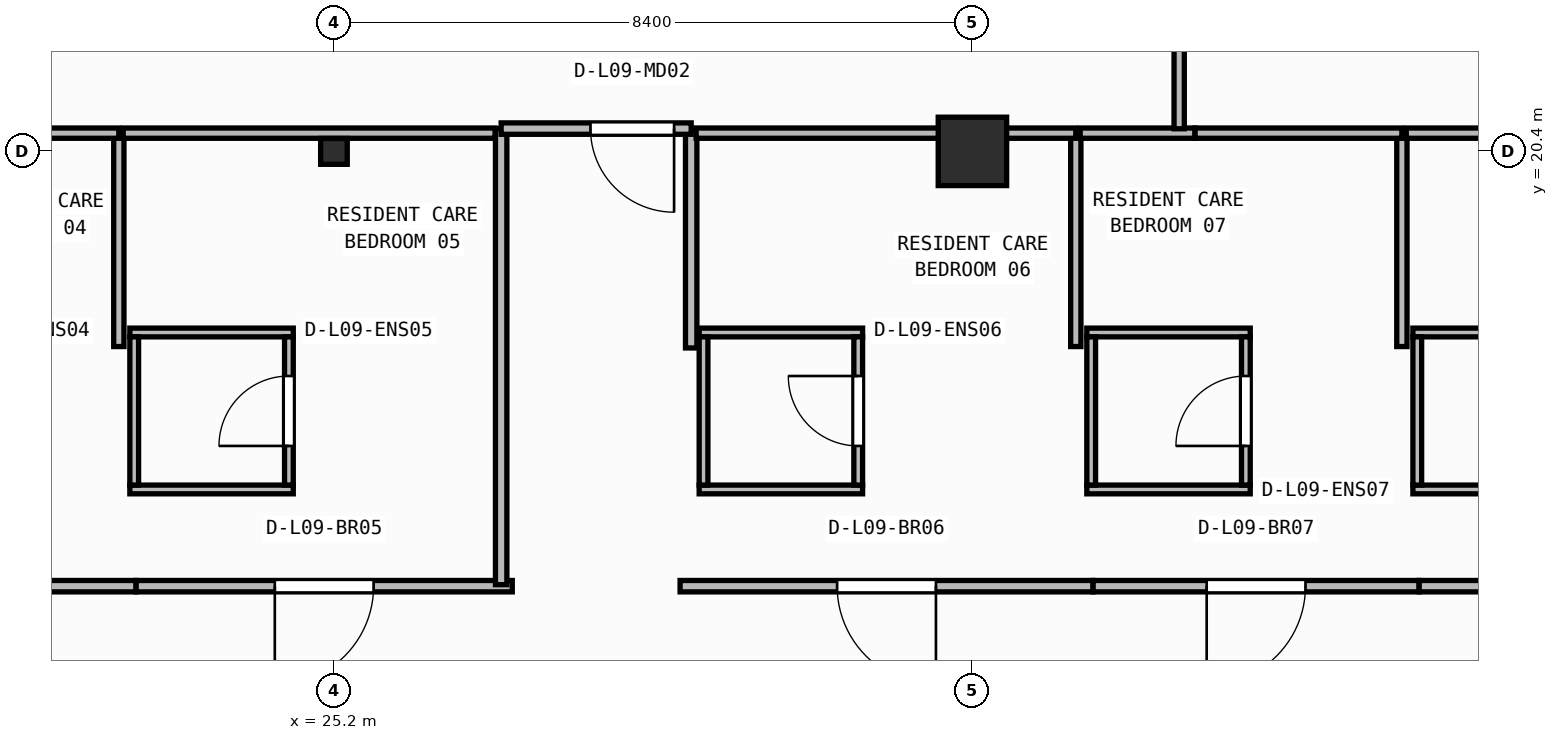
"""IFC4 building model, lengths in metres.
Left out: names, types, materials, properties, quantities, classifications, styles, units other than length and angle.
Written with IfcOpenShell. Run it as: python <this file> out.ifc"""

import sys

from ifc_helpers import new_model, si_unit, direction, frame, frame_2d, origin, origin_2d, place, context, subcontext, project, spatial, rectangle, i_section, extrude, element, fill, save


model = new_model("IFC4")
c1 = context("Model", 3, precision=1e-05, world=origin(), true_north=direction((0.0, 1.0)))
c2 = subcontext(c1, "Body", "Model", "MODEL_VIEW")
j1 = project(units=[si_unit("LENGTHUNIT", "METRE"), si_unit("PLANEANGLEUNIT", "RADIAN")], contexts=[c1])
p1 = place(None, origin())
s1 = spatial("IfcSite", under=j1, at=p1, CompositionType="ELEMENT")
p2 = place(p1, origin())
s2 = spatial("IfcBuilding", under=s1, at=p2, CompositionType="ELEMENT")
p3 = place(p2, frame((0.0, 0.0, 38.3)))
s3 = spatial("IfcBuildingStorey", under=s2, at=p3, CompositionType="ELEMENT", Elevation=38.3)
p4 = place(p3, frame((25.2, 20.4, 0.0), z_axis=(0.0, 0.0, 1.0), x_axis=(1.0, 0.0, 0.0)))
e1 = element("IfcColumn", 1, at=p4, inside=s3, PredefinedType="COLUMN", context=c2, shape_type="SweptSolid", body=[
    extrude(i_section(OverallWidth=0.35, OverallDepth=0.34, WebThickness=0.016, FlangeThickness=0.028, at=origin_2d()), origin(), (0.0, 0.0, 1.0), 3.95),
])
p5 = place(p3, frame((33.6, 20.4, 0.0), z_axis=(0.0, 0.0, 1.0), x_axis=(1.0, 0.0, 0.0)))
e2 = element("IfcColumn", 2, at=p5, inside=s3, PredefinedType="COLUMN", context=c2, shape_type="SweptSolid", body=[
    extrude(rectangle(XDim=0.9, YDim=0.9, at=origin_2d()), origin(), (0.0, 0.0, 1.0), 3.95),
])
for number, where, z_axis, x_axis in (
    (3, (22.515, 15.952, 0.0), (0.0, 0.0, 1.0), (1.0, 0.0, 0.0)),
    (4, (22.515, 18.018, 0.0), (0.0, 0.0, 1.0), (1.0, 0.0, 0.0)),
):
    element("IfcWall", number, at=place(p3, frame(where, z_axis=z_axis, x_axis=x_axis)), inside=s3, PredefinedType="PARTITIONING", context=c2, shape_type="SweptSolid", body=[
        extrude(rectangle(XDim=2.15, YDim=0.115, at=frame_2d((1.075, 0.0))), origin(), (0.0, 0.0, 1.0), 3.71),
    ])
p6 = place(p3, frame((22.573, 16.01, 0.0), z_axis=(0.0, 0.0, 1.0), x_axis=(0.0, 1.0, 0.0)))
e5 = element("IfcWall", 5, at=p6, inside=s3, PredefinedType="PARTITIONING", context=c2, shape_type="SweptSolid", body=[
    extrude(rectangle(XDim=1.95, YDim=0.115, at=frame_2d((0.975, 0.0))), origin(), (0.0, 0.0, 1.0), 3.71),
])
p7 = place(p3, frame((24.607, 16.01, 0.0), z_axis=(0.0, 0.0, 1.0), x_axis=(0.0, 1.0, 0.0)))
e6 = element("IfcWall", 6, at=p7, inside=s3, PredefinedType="PARTITIONING", context=c2, shape_type="SweptSolid", body=[
    extrude(rectangle(XDim=1.95, YDim=0.115, at=frame_2d((0.975, 0.0))), origin(), (0.0, 0.0, 1.0), 3.71),
])
p8 = place(p7, frame((0.515, 0.0, 0.0)))
e7 = element("IfcOpeningElement", 7, at=p8, cuts=e6, PredefinedType="OPENING", context=c2, shape_type="SweptSolid", body=[
    extrude(rectangle(XDim=0.92, YDim=2.1, at=frame_2d((0.46, 1.05))), frame((0.0, 0.067, 0.0), z_axis=(0.0, -1.0, 0.0), x_axis=(1.0, 0.0, 0.0)), (0.0, 0.0, 1.0), 0.135),
])
p9 = place(p3, frame((30.005, 15.952, 0.0), z_axis=(0.0, 0.0, 1.0), x_axis=(1.0, 0.0, 0.0)))
e8 = element("IfcWall", 8, at=p9, inside=s3, PredefinedType="PARTITIONING", context=c2, shape_type="SweptSolid", body=[
    extrude(rectangle(XDim=2.15, YDim=0.115, at=frame_2d((1.075, 0.0))), origin(), (0.0, 0.0, 1.0), 3.429),
])
p10 = place(p3, frame((30.005, 18.018, 0.0), z_axis=(0.0, 0.0, 1.0), x_axis=(1.0, 0.0, 0.0)))
e9 = element("IfcWall", 9, at=p10, inside=s3, PredefinedType="PARTITIONING", context=c2, shape_type="SweptSolid", body=[
    extrude(rectangle(XDim=2.15, YDim=0.115, at=frame_2d((1.075, 0.0))), origin(), (0.0, 0.0, 1.0), 3.71),
])
p11 = place(p3, frame((30.062, 16.01, 0.0), z_axis=(0.0, 0.0, 1.0), x_axis=(0.0, 1.0, 0.0)))
e10 = element("IfcWall", 10, at=p11, inside=s3, PredefinedType="PARTITIONING", context=c2, shape_type="SweptSolid", body=[
    extrude(rectangle(XDim=1.95, YDim=0.115, at=frame_2d((0.975, 0.0))), origin(), (0.0, 0.0, 1.0), 3.71),
])
p12 = place(p3, frame((32.097, 16.01, 0.0), z_axis=(0.0, 0.0, 1.0), x_axis=(0.0, 1.0, 0.0)))
e11 = element("IfcWall", 11, at=p12, inside=s3, PredefinedType="PARTITIONING", context=c2, shape_type="SweptSolid", body=[
    extrude(rectangle(XDim=1.95, YDim=0.115, at=frame_2d((0.975, 0.0))), origin(), (0.0, 0.0, 1.0), 3.71),
])
p13 = place(p12, frame((0.515, 0.0, 0.0)))
e12 = element("IfcOpeningElement", 12, at=p13, cuts=e11, PredefinedType="OPENING", context=c2, shape_type="SweptSolid", body=[
    extrude(rectangle(XDim=0.92, YDim=2.1, at=frame_2d((0.46, 1.05))), frame((0.0, 0.067, 0.0), z_axis=(0.0, -1.0, 0.0), x_axis=(1.0, 0.0, 0.0)), (0.0, 0.0, 1.0), 0.135),
])
p14 = place(p3, frame((35.105, 15.952, 0.0), z_axis=(0.0, 0.0, 1.0), x_axis=(1.0, 0.0, 0.0)))
e13 = element("IfcWall", 13, at=p14, inside=s3, PredefinedType="PARTITIONING", context=c2, shape_type="SweptSolid", body=[
    extrude(rectangle(XDim=2.15, YDim=0.115, at=frame_2d((1.075, 0.0))), origin(), (0.0, 0.0, 1.0), 3.429),
])
p15 = place(p3, frame((35.105, 18.018, 0.0), z_axis=(0.0, 0.0, 1.0), x_axis=(1.0, 0.0, 0.0)))
e14 = element("IfcWall", 14, at=p15, inside=s3, PredefinedType="PARTITIONING", context=c2, shape_type="SweptSolid", body=[
    extrude(rectangle(XDim=2.15, YDim=0.115, at=frame_2d((1.075, 0.0))), origin(), (0.0, 0.0, 1.0), 3.71),
])
p16 = place(p3, frame((35.163, 16.01, 0.0), z_axis=(0.0, 0.0, 1.0), x_axis=(0.0, 1.0, 0.0)))
e15 = element("IfcWall", 15, at=p16, inside=s3, PredefinedType="PARTITIONING", context=c2, shape_type="SweptSolid", body=[
    extrude(rectangle(XDim=1.95, YDim=0.115, at=frame_2d((0.975, 0.0))), origin(), (0.0, 0.0, 1.0), 3.71),
])
p17 = place(p3, frame((37.198, 16.01, 0.0), z_axis=(0.0, 0.0, 1.0), x_axis=(0.0, 1.0, 0.0)))
e16 = element("IfcWall", 16, at=p17, inside=s3, PredefinedType="PARTITIONING", context=c2, shape_type="SweptSolid", body=[
    extrude(rectangle(XDim=1.95, YDim=0.115, at=frame_2d((0.975, 0.0))), origin(), (0.0, 0.0, 1.0), 3.71),
])
p18 = place(p17, frame((0.515, 0.0, 0.0)))
e17 = element("IfcOpeningElement", 17, at=p18, cuts=e16, PredefinedType="OPENING", context=c2, shape_type="SweptSolid", body=[
    extrude(rectangle(XDim=0.92, YDim=2.1, at=frame_2d((0.46, 1.05))), frame((0.0, 0.067, 0.0), z_axis=(0.0, -1.0, 0.0), x_axis=(1.0, 0.0, 0.0)), (0.0, 0.0, 1.0), 0.135),
])
p19 = place(p3, frame((39.395, 15.952, 0.0), z_axis=(0.0, 0.0, 1.0), x_axis=(1.0, 0.0, 0.0)))
e18 = element("IfcWall", 18, at=p19, inside=s3, PredefinedType="PARTITIONING", context=c2, shape_type="SweptSolid", body=[
    extrude(rectangle(XDim=2.15, YDim=0.115, at=frame_2d((1.075, 0.0))), origin(), (0.0, 0.0, 1.0), 3.429),
])
p20 = place(p3, frame((39.395, 18.018, 0.0), z_axis=(0.0, 0.0, 1.0), x_axis=(1.0, 0.0, 0.0)))
e19 = element("IfcWall", 19, at=p20, inside=s3, PredefinedType="PARTITIONING", context=c2, shape_type="SweptSolid", body=[
    extrude(rectangle(XDim=2.15, YDim=0.115, at=frame_2d((1.075, 0.0))), origin(), (0.0, 0.0, 1.0), 3.71),
])
p21 = place(p3, frame((39.452, 16.01, 0.0), z_axis=(0.0, 0.0, 1.0), x_axis=(0.0, 1.0, 0.0)))
e20 = element("IfcWall", 20, at=p21, inside=s3, PredefinedType="PARTITIONING", context=c2, shape_type="SweptSolid", body=[
    extrude(rectangle(XDim=1.95, YDim=0.115, at=frame_2d((0.975, 0.0))), origin(), (0.0, 0.0, 1.0), 3.71),
])
p22 = place(p3, frame((22.596, 14.68, 0.0), z_axis=(0.0, 0.0, 1.0), x_axis=(-1.0, 0.0, 0.0)))
e21 = element("IfcWall", 21, at=p22, inside=s3, PredefinedType="PARTITIONING", context=c2, shape_type="SweptSolid", body=[
    extrude(rectangle(XDim=4.508, YDim=0.15, at=frame_2d((2.254, 0.0))), origin(), (0.0, 0.0, 1.0), 3.71),
])
p23 = place(p22, frame((1.604, 0.0, 0.0)))
e22 = element("IfcOpeningElement", 22, at=p23, cuts=e21, PredefinedType="OPENING", context=c2, shape_type="SweptSolid", body=[
    extrude(rectangle(XDim=1.3, YDim=2.15, at=frame_2d((0.65, 1.075))), frame((0.0, 0.085, 0.0), z_axis=(0.0, -1.0, 0.0), x_axis=(1.0, 0.0, 0.0)), (0.0, 0.0, 1.0), 0.17),
])
p24 = place(p3, frame((27.546, 14.68, 0.0), z_axis=(0.0, 0.0, 1.0), x_axis=(-1.0, 0.0, 0.0)))
e23 = element("IfcWall", 23, at=p24, inside=s3, PredefinedType="PARTITIONING", context=c2, shape_type="SweptSolid", body=[
    extrude(rectangle(XDim=4.948, YDim=0.15, at=frame_2d((2.474, 0.0))), origin(), (0.0, 0.0, 1.0), 3.71),
])
p25 = place(p24, frame((1.824, 0.0, 0.0)))
e24 = element("IfcOpeningElement", 24, at=p25, cuts=e23, PredefinedType="OPENING", context=c2, shape_type="SweptSolid", body=[
    extrude(rectangle(XDim=1.3, YDim=2.15, at=frame_2d((0.65, 1.075))), frame((0.0, 0.085, 0.0), z_axis=(0.0, -1.0, 0.0), x_axis=(1.0, 0.0, 0.0)), (0.0, 0.0, 1.0), 0.17),
])
p26 = place(p3, frame((35.186, 14.68, 0.0), z_axis=(0.0, 0.0, 1.0), x_axis=(-1.0, 0.0, 0.0)))
e25 = element("IfcWall", 25, at=p26, inside=s3, PredefinedType="PARTITIONING", context=c2, shape_type="SweptSolid", body=[
    extrude(rectangle(XDim=5.432, YDim=0.15, at=frame_2d((2.716, 0.0))), origin(), (0.0, 0.0, 1.0), 3.71),
])
p27 = place(p26, frame((2.066, 0.0, 0.0)))
e26 = element("IfcOpeningElement", 26, at=p27, cuts=e25, PredefinedType="OPENING", context=c2, shape_type="SweptSolid", body=[
    extrude(rectangle(XDim=1.3, YDim=2.15, at=frame_2d((0.65, 1.075))), frame((0.0, 0.085, 0.0), z_axis=(0.0, -1.0, 0.0), x_axis=(1.0, 0.0, 0.0)), (0.0, 0.0, 1.0), 0.17),
])
p28 = place(p3, frame((39.476, 14.68, 0.0), z_axis=(0.0, 0.0, 1.0), x_axis=(-1.0, 0.0, 0.0)))
e27 = element("IfcWall", 27, at=p28, inside=s3, PredefinedType="PARTITIONING", context=c2, shape_type="SweptSolid", body=[
    extrude(rectangle(XDim=4.288, YDim=0.15, at=frame_2d((2.144, 0.0))), origin(), (0.0, 0.0, 1.0), 3.71),
])
p29 = place(p28, frame((1.494, 0.0, 0.0)))
e28 = element("IfcOpeningElement", 28, at=p29, cuts=e27, PredefinedType="OPENING", context=c2, shape_type="SweptSolid", body=[
    extrude(rectangle(XDim=1.3, YDim=2.15, at=frame_2d((0.65, 1.075))), frame((0.0, 0.085, 0.0), z_axis=(0.0, -1.0, 0.0), x_axis=(1.0, 0.0, 0.0)), (0.0, 0.0, 1.0), 0.17),
])
p30 = place(p3, frame((44.136, 14.68, 0.0), z_axis=(0.0, 0.0, 1.0), x_axis=(-1.0, 0.0, 0.0)))
e29 = element("IfcWall", 29, at=p30, inside=s3, PredefinedType="PARTITIONING", context=c2, shape_type="SweptSolid", body=[
    extrude(rectangle(XDim=4.658, YDim=0.15, at=frame_2d((2.329, 0.0))), origin(), (0.0, 0.0, 1.0), 3.71),
])
p31 = place(p30, frame((1.679, 0.0, 0.0)))
e30 = element("IfcOpeningElement", 30, at=p31, cuts=e29, PredefinedType="OPENING", context=c2, shape_type="SweptSolid", body=[
    extrude(rectangle(XDim=1.3, YDim=2.15, at=frame_2d((0.65, 1.075))), frame((0.0, 0.085, 0.0), z_axis=(0.0, -1.0, 0.0), x_axis=(1.0, 0.0, 0.0)), (0.0, 0.0, 1.0), 0.17),
])
p32 = place(p3, frame((27.4, 20.7, 0.0), z_axis=(0.0, 0.0, 1.0), x_axis=(0.0, -1.0, 0.0)))
e31 = element("IfcWall", 31, at=p32, inside=s3, PredefinedType="PARTITIONING", context=c2, shape_type="SweptSolid", body=[
    extrude(rectangle(XDim=6.0, YDim=0.15, at=frame_2d((3.0, 0.0))), origin(), (0.0, 0.0, 1.0), 3.71),
])
p33 = place(p3, frame((29.9, 17.814, 0.0), z_axis=(0.0, 0.0, 1.0), x_axis=(0.0, 1.0, 0.0)))
e32 = element("IfcWall", 32, at=p33, inside=s3, PredefinedType="PARTITIONING", context=c2, shape_type="SweptSolid", body=[
    extrude(rectangle(XDim=2.886, YDim=0.15, at=frame_2d((1.443, 0.0))), origin(), (0.0, 0.0, 1.0), 3.71),
])
p34 = place(p3, frame((29.9, 20.7, 0.0), z_axis=(0.0, 0.0, 1.0), x_axis=(-1.0, 0.0, 0.0)))
e33 = element("IfcWall", 33, at=p34, inside=s3, PredefinedType="PARTITIONING", context=c2, shape_type="SweptSolid", body=[
    extrude(rectangle(XDim=2.5, YDim=0.15, at=frame_2d((1.25, 0.0))), origin(), (0.0, 0.0, 1.0), 3.073),
])
p35 = place(p34, frame((0.225, 0.0, 0.0)))
e34 = element("IfcOpeningElement", 34, at=p35, cuts=e33, PredefinedType="OPENING", context=c2, shape_type="SweptSolid", body=[
    extrude(rectangle(XDim=1.1, YDim=2.1, at=frame_2d((0.55, 1.05))), frame((0.0, 0.085, 0.0), z_axis=(0.0, -1.0, 0.0), x_axis=(1.0, 0.0, 0.0)), (0.0, 0.0, 1.0), 0.17),
])
p36 = place(p3, frame((22.37, 17.833, 0.0), z_axis=(0.0, 0.0, 1.0), x_axis=(0.0, 1.0, 0.0)))
e35 = element("IfcWall", 35, at=p36, inside=s3, PredefinedType="PARTITIONING", context=c2, shape_type="SweptSolid", body=[
    extrude(rectangle(XDim=2.807, YDim=0.135, at=frame_2d((1.404, 0.0))), origin(), (0.0, 0.0, 1.0), 3.71),
])
p37 = place(p3, frame((22.37, 20.64, 0.0), z_axis=(0.0, 0.0, 1.0), x_axis=(-1.0, 0.0, 0.0)))
e36 = element("IfcWall", 36, at=p37, inside=s3, PredefinedType="PARTITIONING", context=c2, shape_type="SweptSolid", body=[
    extrude(rectangle(XDim=4.453, YDim=0.135, at=frame_2d((2.226, 0.0))), origin(), (0.0, 0.0, 1.0), 3.073),
])
p38 = place(p3, frame((27.32, 20.64, 0.0), z_axis=(0.0, 0.0, 1.0), x_axis=(-1.0, 0.0, 0.0)))
e37 = element("IfcWall", 37, at=p38, inside=s3, PredefinedType="PARTITIONING", context=c2, shape_type="SweptSolid", body=[
    extrude(rectangle(XDim=4.893, YDim=0.135, at=frame_2d((2.446, 0.0))), origin(), (0.0, 0.0, 1.0), 3.073),
])
p39 = place(p3, frame((34.96, 17.833, 0.0), z_axis=(0.0, 0.0, 1.0), x_axis=(0.0, 1.0, 0.0)))
e38 = element("IfcWall", 38, at=p39, inside=s3, PredefinedType="PARTITIONING", context=c2, shape_type="SweptSolid", body=[
    extrude(rectangle(XDim=2.807, YDim=0.135, at=frame_2d((1.404, 0.0))), origin(), (0.0, 0.0, 1.0), 3.71),
])
p40 = place(p3, frame((34.96, 20.64, 0.0), z_axis=(0.0, 0.0, 1.0), x_axis=(-1.0, 0.0, 0.0)))
e39 = element("IfcWall", 39, at=p40, inside=s3, PredefinedType="PARTITIONING", context=c2, shape_type="SweptSolid", body=[
    extrude(rectangle(XDim=4.995, YDim=0.135, at=frame_2d((2.498, 0.0))), origin(), (0.0, 0.0, 1.0), 3.073),
])
p41 = place(p3, frame((39.25, 17.833, 0.0), z_axis=(0.0, 0.0, 1.0), x_axis=(0.0, 1.0, 0.0)))
e40 = element("IfcWall", 40, at=p41, inside=s3, PredefinedType="PARTITIONING", context=c2, shape_type="SweptSolid", body=[
    extrude(rectangle(XDim=2.807, YDim=0.135, at=frame_2d((1.404, 0.0))), origin(), (0.0, 0.0, 1.0), 3.71),
])
p42 = place(p3, frame((36.528, 20.64, 0.0), z_axis=(0.0, 0.0, 1.0), x_axis=(-1.0, 0.0, 0.0)))
e41 = element("IfcWall", 41, at=p42, inside=s3, PredefinedType="PARTITIONING", context=c2, shape_type="SweptSolid", body=[
    extrude(rectangle(XDim=1.51, YDim=0.135, at=frame_2d((0.755, 0.0))), origin(), (0.0, 0.0, 1.0), 3.073),
])
p43 = place(p3, frame((39.25, 20.64, 0.0), z_axis=(0.0, 0.0, 1.0), x_axis=(-1.0, 0.0, 0.0)))
e42 = element("IfcWall", 42, at=p43, inside=s3, PredefinedType="PARTITIONING", context=c2, shape_type="SweptSolid", body=[
    extrude(rectangle(XDim=2.72, YDim=0.135, at=frame_2d((1.36, 0.0))), origin(), (0.0, 0.0, 1.0), 3.073),
])
p44 = place(p3, frame((43.91, 20.64, 0.0), z_axis=(0.0, 0.0, 1.0), x_axis=(-1.0, 0.0, 0.0)))
e43 = element("IfcWall", 43, at=p44, inside=s3, PredefinedType="PARTITIONING", context=c2, shape_type="SweptSolid", body=[
    extrude(rectangle(XDim=4.602, YDim=0.135, at=frame_2d((2.301, 0.0))), origin(), (0.0, 0.0, 1.0), 3.073),
])
p45 = place(p3, frame((36.32, 20.698, 0.0), z_axis=(0.0, 0.0, 1.0), x_axis=(0.0, 1.0, 0.0)))
e44 = element("IfcWall", 44, at=p45, inside=s3, PredefinedType="PARTITIONING", context=c2, shape_type="SweptSolid", body=[
    extrude(rectangle(XDim=10.678, YDim=0.135, at=frame_2d((5.339, 0.0))), origin(), (0.0, 0.0, 1.0), 3.71),
])
p46 = place(p45, frame((4.789, 0.0, 0.0)))
e45 = element("IfcOpeningElement", 45, at=p46, cuts=e44, PredefinedType="OPENING", context=c2, shape_type="SweptSolid", body=[
    extrude(rectangle(XDim=1.1, YDim=2.1, at=frame_2d((0.55, 1.05))), frame((0.0, 0.077, 0.0), z_axis=(0.0, -1.0, 0.0), x_axis=(1.0, 0.0, 0.0)), (0.0, 0.0, 1.0), 0.155),
])
p47 = place(p8, origin())
e46 = element("IfcDoor", 46, at=p47, inside=s3, OperationType="SINGLE_SWING_LEFT", PredefinedType="DOOR", context=c2, shape_type="SweptSolid", body=[
    extrude(rectangle(XDim=0.92, YDim=2.1, at=frame_2d((0.46, 1.05))), frame((0.0, 0.025, 0.0), z_axis=(0.0, -1.0, 0.0), x_axis=(1.0, 0.0, 0.0)), (0.0, 0.0, 1.0), 0.05),
])
fill(e7, e46)
p48 = place(p13, origin())
e47 = element("IfcDoor", 47, at=p48, inside=s3, OperationType="SINGLE_SWING_RIGHT", PredefinedType="DOOR", context=c2, shape_type="SweptSolid", body=[
    extrude(rectangle(XDim=0.92, YDim=2.1, at=frame_2d((0.46, 1.05))), frame((0.0, 0.025, 0.0), z_axis=(0.0, -1.0, 0.0), x_axis=(1.0, 0.0, 0.0)), (0.0, 0.0, 1.0), 0.05),
])
fill(e12, e47)
p49 = place(p18, origin())
e48 = element("IfcDoor", 48, at=p49, inside=s3, OperationType="SINGLE_SWING_LEFT", PredefinedType="DOOR", context=c2, shape_type="SweptSolid", body=[
    extrude(rectangle(XDim=0.92, YDim=2.1, at=frame_2d((0.46, 1.05))), frame((0.0, 0.025, 0.0), z_axis=(0.0, -1.0, 0.0), x_axis=(1.0, 0.0, 0.0)), (0.0, 0.0, 1.0), 0.05),
])
fill(e17, e48)
p50 = place(p25, origin())
e49 = element("IfcDoor", 49, at=p50, inside=s3, OperationType="SINGLE_SWING_RIGHT", PredefinedType="DOOR", context=c2, shape_type="SweptSolid", body=[
    extrude(rectangle(XDim=1.3, YDim=2.15, at=frame_2d((0.65, 1.075))), frame((0.0, 0.025, 0.0), z_axis=(0.0, -1.0, 0.0), x_axis=(1.0, 0.0, 0.0)), (0.0, 0.0, 1.0), 0.05),
])
fill(e24, e49)
p51 = place(p27, origin())
e50 = element("IfcDoor", 50, at=p51, inside=s3, OperationType="SINGLE_SWING_LEFT", PredefinedType="DOOR", context=c2, shape_type="SweptSolid", body=[
    extrude(rectangle(XDim=1.3, YDim=2.15, at=frame_2d((0.65, 1.075))), frame((0.0, 0.025, 0.0), z_axis=(0.0, -1.0, 0.0), x_axis=(1.0, 0.0, 0.0)), (0.0, 0.0, 1.0), 0.05),
])
fill(e26, e50)
p52 = place(p29, origin())
e51 = element("IfcDoor", 51, at=p52, inside=s3, OperationType="SINGLE_SWING_RIGHT", PredefinedType="DOOR", context=c2, shape_type="SweptSolid", body=[
    extrude(rectangle(XDim=1.3, YDim=2.15, at=frame_2d((0.65, 1.075))), frame((0.0, 0.025, 0.0), z_axis=(0.0, -1.0, 0.0), x_axis=(1.0, 0.0, 0.0)), (0.0, 0.0, 1.0), 0.05),
])
fill(e28, e51)
p53 = place(p35, origin())
e52 = element("IfcDoor", 52, at=p53, inside=s3, OperationType="SINGLE_SWING_LEFT", PredefinedType="DOOR", context=c2, shape_type="SweptSolid", body=[
    extrude(rectangle(XDim=1.1, YDim=2.1, at=frame_2d((0.55, 1.05))), frame((0.0, 0.025, 0.0), z_axis=(0.0, -1.0, 0.0), x_axis=(1.0, 0.0, 0.0)), (0.0, 0.0, 1.0), 0.05),
])
fill(e34, e52)
save(model, sys.argv[1])
